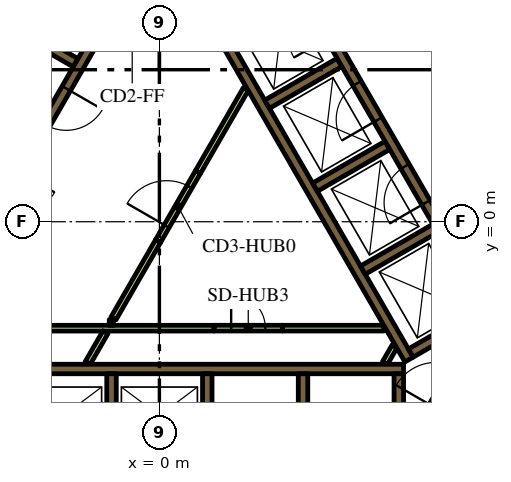
"""IFC4 building model, lengths in metres.
Left out: names, types, materials, properties, quantities, classifications, styles, units other than length and angle.
Written with IfcOpenShell. Run it as: python <this file> out.ifc"""

import sys

from ifc_helpers import new_model, si_unit, direction, frame, frame_2d, origin, place, context, subcontext, project, spatial, polyline, rectangle, outline, extrude, element, fill, save


model = new_model("IFC4")
c1 = context("Model", 3, precision=1e-05, world=origin(), true_north=direction((0.0, 1.0)))
c2 = subcontext(c1, "Body", "Model", "MODEL_VIEW")
j1 = project(units=[si_unit("LENGTHUNIT", "METRE"), si_unit("PLANEANGLEUNIT", "RADIAN")], contexts=[c1])
p1 = place(None, origin())
s1 = spatial("IfcSite", under=j1, at=p1, CompositionType="ELEMENT")
p2 = place(p1, origin())
s2 = spatial("IfcBuilding", under=s1, at=p2, CompositionType="ELEMENT")
p3 = place(p2, frame((0.0, 0.0, 134.4)))
s3 = spatial("IfcBuildingStorey", under=s2, at=p3, CompositionType="ELEMENT", Elevation=134.4)
p4 = place(p3, frame((6.776, 13.364, 0.0), z_axis=(0.0, 0.0, 1.0), x_axis=(0.500004177138, -0.8660229921, 0.0)))
e1 = element("IfcWall", 1, at=p4, inside=s3, PredefinedType="SOLIDWALL", context=c2, shape_type="SweptSolid", body=[
    extrude(rectangle(XDim=20.204, YDim=0.9, at=frame_2d((10.102, 0.0))), origin(), (0.0, 0.0, 1.0), 7.2),
])
p5 = place(p3, frame((-6.19, -3.875, 0.0), z_axis=(0.0, 0.0, 1.0), x_axis=(1.0, 0.0, 0.0)))
e2 = element("IfcWall", 2, at=p5, inside=s3, PredefinedType="SOLIDWALL", context=c2, shape_type="SweptSolid", body=[
    extrude(rectangle(XDim=12.615, YDim=0.25, at=frame_2d((6.307, 0.0))), origin(), (0.0, 0.0, 1.0), 7.2),
])
p6 = place(p3, frame((6.3, -7.268, 0.0), z_axis=(0.0, 0.0, 1.0), x_axis=(0.0, 1.0, 0.0)))
e3 = element("IfcWall", 3, at=p6, inside=s3, PredefinedType="SOLIDWALL", context=c2, shape_type="SweptSolid", body=[
    extrude(rectangle(XDim=3.268, YDim=0.25, at=frame_2d((1.634, 0.0))), origin(), (0.0, 0.0, 1.0), 7.2),
])
for number, where, z_axis, x_axis in (
    (4, (3.78, -4.0, 0.0), (0.0, 0.0, 1.0), (0.0, -1.0, 0.0)),
    (5, (1.26, -4.0, 0.0), (0.0, 0.0, 1.0), (0.0, -1.0, 0.0)),
    (6, (-1.26, -4.0, 0.0), (0.0, 0.0, 1.0), (0.0, -1.0, 0.0)),
):
    element("IfcWall", number, at=place(p3, frame(where, z_axis=z_axis, x_axis=x_axis)), inside=s3, PredefinedType="SOLIDWALL", context=c2, shape_type="SweptSolid", body=[
        extrude(rectangle(XDim=2.2, YDim=0.25, at=frame_2d((1.1, 0.0))), origin(), (0.0, 0.0, 1.0), 7.2),
    ])
p7 = place(p3, origin())
e7 = element("IfcWall", 7, at=p7, inside=s3, PredefinedType="SOLIDWALL", context=c2, shape_type="SweptSolid", body=[
    extrude(outline(polyline([(0.335, 6.925), (0.335, 6.925), (0.335, 7.075), (0.335, 7.075), (0.335, 7.075), (0.245, 7.075), (0.035, 7.439), (0.252, 7.564), (0.377, 7.348), (1.512, 5.382), (1.637, 5.165), (2.221, 4.153), (2.771, 3.199), (2.896, 2.983), (3.138, 2.564), (4.031, 1.017), (4.156, 0.801), (5.292, -1.165), (5.417, -1.382), (6.073, -2.519), (6.552, -3.348), (6.677, -3.564), (6.46, -3.689), (0.332, 6.925), (0.335, 6.925), (0.335, 6.925)])), origin(), (0.0, 0.0, 1.0), 7.2),
])
for number, where, z_axis, x_axis in (
    (8, (2.834, 3.091, 0.0), (0.0, 0.0, 1.0), (0.866, 0.5, 0.0)),
    (9, (4.094, 0.909, 0.0), (0.0, 0.0, 1.0), (0.866, 0.5, 0.0)),
    (10, (5.354, -1.274, 0.0), (0.0, 0.0, 1.0), (0.866, 0.5, 0.0)),
):
    element("IfcWall", number, at=place(p3, frame(where, z_axis=z_axis, x_axis=x_axis)), inside=s3, PredefinedType="SOLIDWALL", context=c2, shape_type="SweptSolid", body=[
        extrude(rectangle(XDim=2.2, YDim=0.25, at=frame_2d((1.1, 0.0))), origin(), (0.0, 0.0, 1.0), 7.2),
    ])
p8 = place(p3, frame((9.352, -1.875, 0.0), z_axis=(0.0, 0.0, 1.0), x_axis=(-0.866024844342, -0.500000968981, 0.0)))
e11 = element("IfcWall", 11, at=p8, inside=s3, PredefinedType="SOLIDWALL", context=c2, shape_type="SweptSolid", body=[
    extrude(rectangle(XDim=3.162, YDim=0.25, at=frame_2d((1.581, 0.0))), origin(), (0.0, 0.0, 1.0), 7.2),
])
p9 = place(p3, frame((-8.06, -1.311, 0.0), z_axis=(0.0, 0.0, 1.0), x_axis=(0.50000273126, 0.866023826885, 0.0)))
e12 = element("IfcWall", 12, at=p9, inside=s3, PredefinedType="SOLIDWALL", context=c2, shape_type="SweptSolid", body=[
    extrude(rectangle(XDim=10.33, YDim=0.25, at=frame_2d((5.165, 0.0))), origin(), (0.0, 0.0, 1.0), 7.2),
])
p10 = place(p3, frame((-2.204, 4.182, 0.0), z_axis=(0.0, 0.0, 1.0), x_axis=(-0.866008176907, 0.50002983664, 0.0)))
e13 = element("IfcWall", 13, at=p10, inside=s3, PredefinedType="SOLIDWALL", context=c2, shape_type="SweptSolid", body=[
    extrude(rectangle(XDim=2.2, YDim=0.25, at=frame_2d((1.1, 0.0))), origin(), (0.0, 0.0, 1.0), 7.2),
])
p11 = place(p3, frame((-6.086, -2.801, 0.0), z_axis=(0.0, 0.0, 1.0), x_axis=(1.0, 0.0, 0.0)))
e14 = element("IfcWall", 14, at=p11, inside=s3, PredefinedType="PARTITIONING", context=c2, shape_type="SweptSolid", body=[
    extrude(rectangle(XDim=7.524, YDim=0.15, at=frame_2d((3.762, 0.0))), origin(), (0.0, 0.0, 1.0), 6.15),
])
p12 = place(p3, frame((-1.887, -3.718, 0.0), z_axis=(0.0, 0.0, 1.0), x_axis=(0.499842898591, 0.866116087328, 0.0)))
e15 = element("IfcWall", 15, at=p12, inside=s3, PredefinedType="PARTITIONING", context=c2, shape_type="SweptSolid", body=[
    extrude(rectangle(XDim=0.936, YDim=0.15, at=frame_2d((0.468, 0.0))), origin(), (0.0, 0.0, 1.0), 6.15),
])
p13 = place(p3, frame((-1.212, -2.651, 0.0), z_axis=(0.0, 0.0, 1.0), x_axis=(-1.0, 0.0, 0.0)))
e16 = element("IfcWall", 16, at=p13, inside=s3, PredefinedType="PARTITIONING", context=c2, shape_type="SweptSolid", body=[
    extrude(rectangle(XDim=0.108, YDim=0.15, at=frame_2d((0.054, 0.0))), origin(), (0.0, 0.0, 1.0), 6.15),
])
p14 = place(p3, frame((-1.208, -2.544, 0.0), z_axis=(0.0, 0.0, 1.0), x_axis=(0.499995339376, 0.86602809458, 0.0)))
e17 = element("IfcWall", 17, at=p14, inside=s3, PredefinedType="PARTITIONING", context=c2, shape_type="SweptSolid", body=[
    extrude(rectangle(XDim=2.349, YDim=0.15, at=frame_2d((1.175, 0.0))), origin(), (0.0, 0.0, 1.0), 6.15),
])
p15 = place(p3, frame((5.936, -3.718, 0.0), z_axis=(0.0, 0.0, 1.0), x_axis=(0.499890179513, 0.866088799389, 0.0)))
e18 = element("IfcWall", 18, at=p15, inside=s3, PredefinedType="PARTITIONING", context=c2, shape_type="SweptSolid", body=[
    extrude(rectangle(XDim=0.504, YDim=0.15, at=frame_2d((0.252, 0.0))), origin(), (0.0, 0.0, 1.0), 6.15),
])
p16 = place(p3, frame((3.238, -2.8, 0.0), z_axis=(0.0, 0.0, 1.0), x_axis=(1.0, 0.0, 0.0)))
e19 = element("IfcWall", 19, at=p16, inside=s3, PredefinedType="PARTITIONING", context=c2, shape_type="SweptSolid", body=[
    extrude(rectangle(XDim=2.672, YDim=0.15, at=frame_2d((1.336, 0.0))), origin(), (0.0, 0.0, 1.0), 6.15),
])
p17 = place(p3, frame((1.016, 1.309, 0.0), z_axis=(0.0, 0.0, 1.0), x_axis=(0.49998231768, 0.866035612436, 0.0)))
e20 = element("IfcWall", 20, at=p17, inside=s3, PredefinedType="PARTITIONING", context=c2, shape_type="SweptSolid", body=[
    extrude(rectangle(XDim=2.521, YDim=0.15, at=frame_2d((1.26, 0.0))), origin(), (0.0, 0.0, 1.0), 6.15),
])
p18 = place(p3, frame((11.553, -0.46, 0.0), z_axis=(0.0, 0.0, 1.0), x_axis=(-0.500006514828, 0.866021642414, 0.0)))
e21 = element("IfcWall", 21, at=p18, inside=s3, PredefinedType="SOLIDWALL", context=c2, shape_type="SweptSolid", body=[
    extrude(rectangle(XDim=12.35, YDim=0.25, at=frame_2d((6.175, 0.0))), origin(), (0.0, 0.0, 1.0), 7.2),
])
p19 = place(p18, frame((0.585, 0.0, 0.0)))
e22 = element("IfcOpeningElement", 22, at=p19, cuts=e21, PredefinedType="OPENING", context=c2, shape_type="SweptSolid", body=[
    extrude(rectangle(XDim=1.1, YDim=2.1, at=frame_2d((0.55, 1.05))), frame((0.0, 0.135, 0.0), z_axis=(0.0, -1.0, 0.0), x_axis=(1.0, 0.0, 0.0)), (0.0, 0.0, 1.0), 0.27),
])
p20 = place(p18, frame((3.105, 0.0, 0.0)))
e23 = element("IfcOpeningElement", 23, at=p20, cuts=e21, PredefinedType="OPENING", context=c2, shape_type="SweptSolid", body=[
    extrude(rectangle(XDim=1.1, YDim=2.1, at=frame_2d((0.55, 1.05))), frame((0.0, 0.135, 0.0), z_axis=(0.0, -1.0, 0.0), x_axis=(1.0, 0.0, 0.0)), (0.0, 0.0, 1.0), 0.27),
])
p21 = place(p18, frame((5.625, 0.0, 0.0)))
e24 = element("IfcOpeningElement", 24, at=p21, cuts=e21, PredefinedType="OPENING", context=c2, shape_type="SweptSolid", body=[
    extrude(rectangle(XDim=1.1, YDim=2.1, at=frame_2d((0.55, 1.05))), frame((0.0, 0.135, 0.0), z_axis=(0.0, -1.0, 0.0), x_axis=(1.0, 0.0, 0.0)), (0.0, 0.0, 1.0), 0.27),
])
p22 = place(p18, frame((8.145, 0.0, 0.0)))
e25 = element("IfcOpeningElement", 25, at=p22, cuts=e21, PredefinedType="OPENING", context=c2, shape_type="SweptSolid", body=[
    extrude(rectangle(XDim=1.1, YDim=2.1, at=frame_2d((0.55, 1.05))), frame((0.0, 0.135, 0.0), z_axis=(0.0, -1.0, 0.0), x_axis=(1.0, 0.0, 0.0)), (0.0, 0.0, 1.0), 0.27),
])
p23 = place(p18, frame((10.665, 0.0, 0.0)))
e26 = element("IfcOpeningElement", 26, at=p23, cuts=e21, PredefinedType="OPENING", context=c2, shape_type="SweptSolid", body=[
    extrude(rectangle(XDim=1.1, YDim=2.1, at=frame_2d((0.55, 1.05))), frame((0.0, 0.135, 0.0), z_axis=(0.0, -1.0, 0.0), x_axis=(1.0, 0.0, 0.0)), (0.0, 0.0, 1.0), 0.27),
])
p24 = place(p3, frame((8.565, -2.185, 0.0), z_axis=(0.0, 0.0, 1.0), x_axis=(-0.499997954832, 0.866026584559, 0.0)))
e27 = element("IfcWall", 27, at=p24, inside=s3, PredefinedType="SOLIDWALL", context=c2, shape_type="SweptSolid", body=[
    extrude(rectangle(XDim=12.35, YDim=0.25, at=frame_2d((6.175, 0.0))), origin(), (0.0, 0.0, 1.0), 7.2),
])
p25 = place(p24, frame((0.585, 0.0, 0.0)))
e28 = element("IfcOpeningElement", 28, at=p25, cuts=e27, PredefinedType="OPENING", context=c2, shape_type="SweptSolid", body=[
    extrude(rectangle(XDim=1.1, YDim=2.1, at=frame_2d((0.55, 1.05))), frame((0.0, 0.135, 0.0), z_axis=(0.0, -1.0, 0.0), x_axis=(1.0, 0.0, 0.0)), (0.0, 0.0, 1.0), 0.27),
])
p26 = place(p24, frame((3.105, 0.0, 0.0)))
e29 = element("IfcOpeningElement", 29, at=p26, cuts=e27, PredefinedType="OPENING", context=c2, shape_type="SweptSolid", body=[
    extrude(rectangle(XDim=1.1, YDim=2.1, at=frame_2d((0.55, 1.05))), frame((0.0, 0.135, 0.0), z_axis=(0.0, -1.0, 0.0), x_axis=(1.0, 0.0, 0.0)), (0.0, 0.0, 1.0), 0.27),
])
p27 = place(p24, frame((5.625, 0.0, 0.0)))
e30 = element("IfcOpeningElement", 30, at=p27, cuts=e27, PredefinedType="OPENING", context=c2, shape_type="SweptSolid", body=[
    extrude(rectangle(XDim=1.1, YDim=2.1, at=frame_2d((0.55, 1.05))), frame((0.0, 0.135, 0.0), z_axis=(0.0, -1.0, 0.0), x_axis=(1.0, 0.0, 0.0)), (0.0, 0.0, 1.0), 0.27),
])
p28 = place(p24, frame((8.145, 0.0, 0.0)))
e31 = element("IfcOpeningElement", 31, at=p28, cuts=e27, PredefinedType="OPENING", context=c2, shape_type="SweptSolid", body=[
    extrude(rectangle(XDim=1.1, YDim=2.1, at=frame_2d((0.55, 1.05))), frame((0.0, 0.135, 0.0), z_axis=(0.0, -1.0, 0.0), x_axis=(1.0, 0.0, 0.0)), (0.0, 0.0, 1.0), 0.27),
])
p29 = place(p24, frame((10.665, 0.0, 0.0)))
e32 = element("IfcOpeningElement", 32, at=p29, cuts=e27, PredefinedType="OPENING", context=c2, shape_type="SweptSolid", body=[
    extrude(rectangle(XDim=1.1, YDim=2.1, at=frame_2d((0.55, 1.05))), frame((0.0, 0.135, 0.0), z_axis=(0.0, -1.0, 0.0), x_axis=(1.0, 0.0, 0.0)), (0.0, 0.0, 1.0), 0.27),
])
p30 = place(p3, frame((-0.898, 6.194, 0.0), z_axis=(0.0, 0.0, 1.0), x_axis=(-0.499996202215, -0.866027596426, 0.0)))
e33 = element("IfcWall", 33, at=p30, inside=s3, PredefinedType="SOLIDWALL", context=c2, shape_type="SweptSolid", body=[
    extrude(rectangle(XDim=9.83, YDim=0.25, at=frame_2d((4.915, 0.0))), origin(), (0.0, 0.0, 1.0), 7.2),
])
p31 = place(p30, frame((0.585, 0.0, 0.0)))
e34 = element("IfcOpeningElement", 34, at=p31, cuts=e33, PredefinedType="OPENING", context=c2, shape_type="SweptSolid", body=[
    extrude(rectangle(XDim=1.1, YDim=2.1, at=frame_2d((0.55, 1.05))), frame((0.0, 0.135, 0.0), z_axis=(0.0, -1.0, 0.0), x_axis=(1.0, 0.0, 0.0)), (0.0, 0.0, 1.0), 0.27),
])
p32 = place(p30, frame((3.105, 0.0, 0.0)))
e35 = element("IfcOpeningElement", 35, at=p32, cuts=e33, PredefinedType="OPENING", context=c2, shape_type="SweptSolid", body=[
    extrude(rectangle(XDim=1.1, YDim=2.1, at=frame_2d((0.55, 1.05))), frame((0.0, 0.135, 0.0), z_axis=(0.0, -1.0, 0.0), x_axis=(1.0, 0.0, 0.0)), (0.0, 0.0, 1.0), 0.27),
])
p33 = place(p30, frame((5.625, 0.0, 0.0)))
e36 = element("IfcOpeningElement", 36, at=p33, cuts=e33, PredefinedType="OPENING", context=c2, shape_type="SweptSolid", body=[
    extrude(rectangle(XDim=1.1, YDim=2.1, at=frame_2d((0.55, 1.05))), frame((0.0, 0.135, 0.0), z_axis=(0.0, -1.0, 0.0), x_axis=(1.0, 0.0, 0.0)), (0.0, 0.0, 1.0), 0.27),
])
p34 = place(p30, frame((8.145, 0.0, 0.0)))
e37 = element("IfcOpeningElement", 37, at=p34, cuts=e33, PredefinedType="OPENING", context=c2, shape_type="SweptSolid", body=[
    extrude(rectangle(XDim=1.1, YDim=2.1, at=frame_2d((0.55, 1.05))), frame((0.0, 0.135, 0.0), z_axis=(0.0, -1.0, 0.0), x_axis=(1.0, 0.0, 0.0)), (0.0, 0.0, 1.0), 0.27),
])
p35 = place(p3, frame((7.048, -5.292, 0.0), z_axis=(0.0, 0.0, 1.0), x_axis=(0.49994051562, 0.866059744384, 0.0)))
e38 = element("IfcWall", 38, at=p35, inside=s3, PredefinedType="SOLIDWALL", context=c2, shape_type="SweptSolid", body=[
    extrude(rectangle(XDim=2.1, YDim=0.4, at=frame_2d((1.05, 0.0))), origin(), (0.0, 0.0, 1.0), 7.2),
])
p36 = place(p35, frame((0.45, 0.0, 0.0)))
e39 = element("IfcOpeningElement", 39, at=p36, cuts=e38, PredefinedType="OPENING", context=c2, shape_type="SweptSolid", body=[
    extrude(rectangle(XDim=1.2, YDim=2.1, at=frame_2d((0.6, 1.05))), frame((0.0, 0.21, 0.0), z_axis=(0.0, -1.0, 0.0), x_axis=(1.0, 0.0, 0.0)), (0.0, 0.0, 1.0), 0.42),
])
p37 = place(p3, frame((-0.034, -0.509, 0.0), z_axis=(0.0, 0.0, 1.0), x_axis=(0.49994051562, 0.866059744384, 0.0)))
e40 = element("IfcWall", 40, at=p37, inside=s3, PredefinedType="PARTITIONING", context=c2, shape_type="SweptSolid", body=[
    extrude(rectangle(XDim=2.1, YDim=0.15, at=frame_2d((1.05, 0.0))), origin(), (0.0, 0.0, 1.0), 6.15),
])
p38 = place(p37, frame((0.45, 0.0, 0.0)))
e41 = element("IfcOpeningElement", 41, at=p38, cuts=e40, PredefinedType="OPENING", context=c2, shape_type="SweptSolid", body=[
    extrude(rectangle(XDim=1.2, YDim=2.1, at=frame_2d((0.6, 1.05))), frame((0.0, 0.085, 0.0), z_axis=(0.0, -1.0, 0.0), x_axis=(1.0, 0.0, 0.0)), (0.0, 0.0, 1.0), 0.17),
])
p39 = place(p3, frame((1.438, -2.8, 0.0), z_axis=(0.0, 0.0, 1.0), x_axis=(1.0, 0.0, 0.0)))
e42 = element("IfcWall", 42, at=p39, inside=s3, PredefinedType="PARTITIONING", context=c2, shape_type="SweptSolid", body=[
    extrude(rectangle(XDim=1.8, YDim=0.15, at=frame_2d((0.9, 0.0))), origin(), (0.0, 0.0, 1.0), 6.15),
])
p40 = place(p39, frame((0.45, 0.0, 0.0)))
e43 = element("IfcOpeningElement", 43, at=p40, cuts=e42, PredefinedType="OPENING", context=c2, shape_type="SweptSolid", body=[
    extrude(rectangle(XDim=0.9, YDim=2.1, at=frame_2d((0.45, 1.05))), frame((0.0, 0.085, 0.0), z_axis=(0.0, -1.0, 0.0), x_axis=(1.0, 0.0, 0.0)), (0.0, 0.0, 1.0), 0.17),
])
p41 = place(p26, origin())
e44 = element("IfcDoor", 44, at=p41, inside=s3, OperationType="DOUBLE_DOOR_SLIDING", PredefinedType="DOOR", context=c2, shape_type="SweptSolid", body=[
    extrude(rectangle(XDim=1.1, YDim=2.1, at=frame_2d((0.55, 1.05))), frame((0.0, 0.025, 0.0), z_axis=(0.0, -1.0, 0.0), x_axis=(1.0, 0.0, 0.0)), (0.0, 0.0, 1.0), 0.05),
])
fill(e29, e44)
p42 = place(p27, origin())
e45 = element("IfcDoor", 45, at=p42, inside=s3, OperationType="DOUBLE_DOOR_SLIDING", PredefinedType="DOOR", context=c2, shape_type="SweptSolid", body=[
    extrude(rectangle(XDim=1.1, YDim=2.1, at=frame_2d((0.55, 1.05))), frame((0.0, 0.025, 0.0), z_axis=(0.0, -1.0, 0.0), x_axis=(1.0, 0.0, 0.0)), (0.0, 0.0, 1.0), 0.05),
])
fill(e30, e45)
p43 = place(p32, origin())
e46 = element("IfcDoor", 46, at=p43, inside=s3, OperationType="DOUBLE_DOOR_SLIDING", PredefinedType="DOOR", context=c2, shape_type="SweptSolid", body=[
    extrude(rectangle(XDim=1.1, YDim=2.1, at=frame_2d((0.55, 1.05))), frame((0.0, 0.025, 0.0), z_axis=(0.0, -1.0, 0.0), x_axis=(1.0, 0.0, 0.0)), (0.0, 0.0, 1.0), 0.05),
])
fill(e35, e46)
p44 = place(p38, origin())
e47 = element("IfcDoor", 47, at=p44, inside=s3, OperationType="SINGLE_SWING_LEFT", PredefinedType="DOOR", context=c2, shape_type="SweptSolid", body=[
    extrude(rectangle(XDim=1.2, YDim=2.1, at=frame_2d((0.6, 1.05))), frame((0.0, 0.025, 0.0), z_axis=(0.0, -1.0, 0.0), x_axis=(1.0, 0.0, 0.0)), (0.0, 0.0, 1.0), 0.05),
])
fill(e41, e47)
p45 = place(p40, origin())
e48 = element("IfcDoor", 48, at=p45, inside=s3, OperationType="SINGLE_SWING_LEFT", PredefinedType="DOOR", context=c2, shape_type="SweptSolid", body=[
    extrude(rectangle(XDim=0.9, YDim=2.1, at=frame_2d((0.45, 1.05))), frame((0.0, 0.025, 0.0), z_axis=(0.0, -1.0, 0.0), x_axis=(1.0, 0.0, 0.0)), (0.0, 0.0, 1.0), 0.05),
])
fill(e43, e48)
save(model, sys.argv[1])
